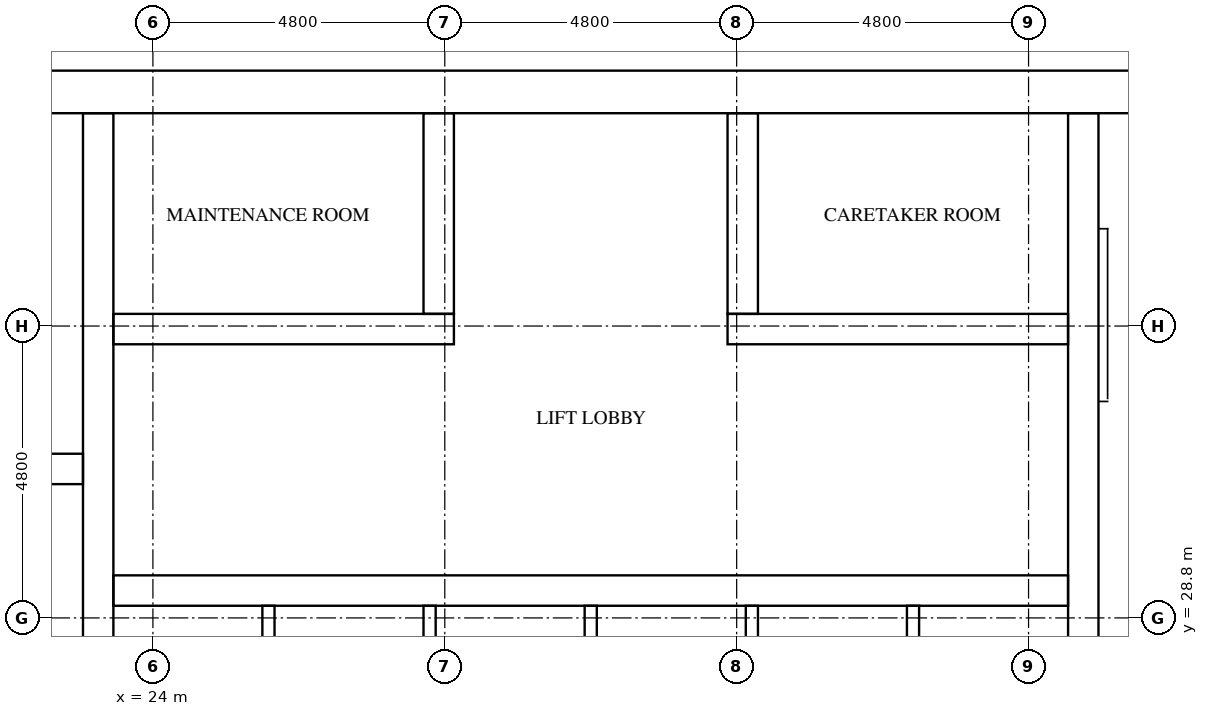
"""IFC4 building model, lengths in metres.
Left out: names, types, materials, properties, quantities, classifications, styles, units other than length and angle.
Written with IfcOpenShell. Run it as: python <this file> out.ifc"""

import sys

from ifc_helpers import new_model, si_unit, direction, frame, frame_2d, origin, place, context, subcontext, project, spatial, rectangle, extrude, element, fill, save


model = new_model("IFC4")
c1 = context("Model", 3, precision=1e-05, world=origin(), true_north=direction((0.0, 1.0)))
c2 = subcontext(c1, "Body", "Model", "MODEL_VIEW")
j1 = project(units=[si_unit("LENGTHUNIT", "METRE"), si_unit("PLANEANGLEUNIT", "RADIAN")], contexts=[c1])
p1 = place(None, origin())
s1 = spatial("IfcSite", under=j1, at=p1, CompositionType="ELEMENT")
p2 = place(p1, origin())
s2 = spatial("IfcBuilding", under=s1, at=p2, CompositionType="ELEMENT")
p3 = place(p2, frame((0.0, 0.0, 219.3)))
s3 = spatial("IfcBuildingStorey", under=s2, at=p3, CompositionType="ELEMENT", Elevation=219.3)
p4 = place(p3, frame((15.0, 37.45, 0.0), z_axis=(0.0, 0.0, 1.0), x_axis=(1.0, 0.0, 0.0)))
e1 = element("IfcWall", 1, at=p4, inside=s3, PredefinedType="SHEAR", context=c2, shape_type="SweptSolid", body=[
    extrude(rectangle(XDim=32.4, YDim=0.7, at=frame_2d((16.2, 0.0))), origin(), (0.0, 0.0, 1.0), 3.2),
])
p5 = place(p4, frame((15.3, 0.0, 0.0)))
e2 = element("IfcOpeningElement", 2, at=p5, cuts=e1, PredefinedType="OPENING", context=c2, shape_type="SweptSolid", body=[
    extrude(rectangle(XDim=1.8, YDim=2.1, at=frame_2d((0.9, 1.05))), frame((0.0, 0.36, 0.0), z_axis=(0.0, -1.0, 0.0), x_axis=(1.0, 0.0, 0.0)), (0.0, 0.0, 1.0), 0.72),
])
p6 = place(p4, frame((1.544, 0.0, 0.0)))
e3 = element("IfcOpeningElement", 3, at=p6, cuts=e1, PredefinedType="OPENING", context=c2, shape_type="SweptSolid", body=[
    extrude(rectangle(XDim=1.0, YDim=2.1, at=frame_2d((0.5, 1.05))), frame((0.0, 0.36, 0.0), z_axis=(0.0, -1.0, 0.0), x_axis=(1.0, 0.0, 0.0)), (0.0, 0.0, 1.0), 0.72),
])
p7 = place(p4, frame((5.219, 0.0, 0.0)))
e4 = element("IfcOpeningElement", 4, at=p7, cuts=e1, PredefinedType="OPENING", context=c2, shape_type="SweptSolid", body=[
    extrude(rectangle(XDim=1.0, YDim=2.1, at=frame_2d((0.5, 1.05))), frame((0.0, 0.36, 0.0), z_axis=(0.0, -1.0, 0.0), x_axis=(1.0, 0.0, 0.0)), (0.0, 0.0, 1.0), 0.72),
])
p8 = place(p3, frame((23.1, 15.7, 0.0), z_axis=(0.0, 0.0, 1.0), x_axis=(0.0, 1.0, 0.0)))
e5 = element("IfcWall", 5, at=p8, inside=s3, PredefinedType="SHEAR", context=c2, shape_type="SweptSolid", body=[
    extrude(rectangle(XDim=21.4, YDim=0.5, at=frame_2d((10.7, 0.0))), origin(), (0.0, 0.0, 1.0), 3.2),
])
p9 = place(p3, frame((39.3, 27.75, 0.0), z_axis=(0.0, 0.0, 1.0), x_axis=(0.0, 1.0, 0.0)))
e6 = element("IfcWall", 6, at=p9, inside=s3, PredefinedType="SHEAR", context=c2, shape_type="SweptSolid", body=[
    extrude(rectangle(XDim=9.35, YDim=0.5, at=frame_2d((4.675, 0.0))), origin(), (0.0, 0.0, 1.0), 3.2),
])
p10 = place(p3, frame((15.7, 31.25, 0.0), z_axis=(0.0, 0.0, 1.0), x_axis=(1.0, 0.0, 0.0)))
e7 = element("IfcWall", 7, at=p10, inside=s3, PredefinedType="SHEAR", context=c2, shape_type="SweptSolid", body=[
    extrude(rectangle(XDim=7.15, YDim=0.5, at=frame_2d((3.575, 0.0))), origin(), (0.0, 0.0, 1.0), 3.2),
])
p11 = place(p3, frame((23.35, 29.25, 0.0), z_axis=(0.0, 0.0, 1.0), x_axis=(1.0, 0.0, 0.0)))
e8 = element("IfcWall", 8, at=p11, inside=s3, PredefinedType="SHEAR", context=c2, shape_type="SweptSolid", body=[
    extrude(rectangle(XDim=15.7, YDim=0.5, at=frame_2d((7.85, 0.0))), origin(), (0.0, 0.0, 1.0), 3.2),
])
p12 = place(p11, frame((0.675, 0.0, 0.0)))
e9 = element("IfcOpeningElement", 9, at=p12, cuts=e8, PredefinedType="OPENING", context=c2, shape_type="SweptSolid", body=[
    extrude(rectangle(XDim=1.1, YDim=2.1, at=frame_2d((0.55, 1.05))), frame((0.0, 0.26, 0.0), z_axis=(0.0, -1.0, 0.0), x_axis=(1.0, 0.0, 0.0)), (0.0, 0.0, 1.0), 0.52),
])
p13 = place(p11, frame((3.325, 0.0, 0.0)))
e10 = element("IfcOpeningElement", 10, at=p13, cuts=e8, PredefinedType="OPENING", context=c2, shape_type="SweptSolid", body=[
    extrude(rectangle(XDim=1.1, YDim=2.1, at=frame_2d((0.55, 1.05))), frame((0.0, 0.26, 0.0), z_axis=(0.0, -1.0, 0.0), x_axis=(1.0, 0.0, 0.0)), (0.0, 0.0, 1.0), 0.52),
])
p14 = place(p11, frame((5.975, 0.0, 0.0)))
e11 = element("IfcOpeningElement", 11, at=p14, cuts=e8, PredefinedType="OPENING", context=c2, shape_type="SweptSolid", body=[
    extrude(rectangle(XDim=1.1, YDim=2.1, at=frame_2d((0.55, 1.05))), frame((0.0, 0.26, 0.0), z_axis=(0.0, -1.0, 0.0), x_axis=(1.0, 0.0, 0.0)), (0.0, 0.0, 1.0), 0.52),
])
p15 = place(p11, frame((8.625, 0.0, 0.0)))
e12 = element("IfcOpeningElement", 12, at=p15, cuts=e8, PredefinedType="OPENING", context=c2, shape_type="SweptSolid", body=[
    extrude(rectangle(XDim=1.1, YDim=2.1, at=frame_2d((0.55, 1.05))), frame((0.0, 0.26, 0.0), z_axis=(0.0, -1.0, 0.0), x_axis=(1.0, 0.0, 0.0)), (0.0, 0.0, 1.0), 0.52),
])
p16 = place(p11, frame((11.275, 0.0, 0.0)))
e13 = element("IfcOpeningElement", 13, at=p16, cuts=e8, PredefinedType="OPENING", context=c2, shape_type="SweptSolid", body=[
    extrude(rectangle(XDim=1.1, YDim=2.1, at=frame_2d((0.55, 1.05))), frame((0.0, 0.26, 0.0), z_axis=(0.0, -1.0, 0.0), x_axis=(1.0, 0.0, 0.0)), (0.0, 0.0, 1.0), 0.52),
])
p17 = place(p11, frame((13.925, 0.0, 0.0)))
e14 = element("IfcOpeningElement", 14, at=p17, cuts=e8, PredefinedType="OPENING", context=c2, shape_type="SweptSolid", body=[
    extrude(rectangle(XDim=1.1, YDim=2.1, at=frame_2d((0.55, 1.05))), frame((0.0, 0.26, 0.0), z_axis=(0.0, -1.0, 0.0), x_axis=(1.0, 0.0, 0.0)), (0.0, 0.0, 1.0), 0.52),
])
p18 = place(p3, frame((23.35, 33.55, 0.0), z_axis=(0.0, 0.0, 1.0), x_axis=(1.0, 0.0, 0.0)))
e15 = element("IfcWall", 15, at=p18, inside=s3, PredefinedType="SHEAR", context=c2, shape_type="SweptSolid", body=[
    extrude(rectangle(XDim=5.6, YDim=0.5, at=frame_2d((2.8, 0.0))), origin(), (0.0, 0.0, 1.0), 3.2),
])
p19 = place(p18, frame((2.05, 0.0, 0.0)))
e16 = element("IfcOpeningElement", 16, at=p19, cuts=e15, PredefinedType="OPENING", context=c2, shape_type="SweptSolid", body=[
    extrude(rectangle(XDim=1.0, YDim=2.1, at=frame_2d((0.5, 1.05))), frame((0.0, 0.26, 0.0), z_axis=(0.0, -1.0, 0.0), x_axis=(1.0, 0.0, 0.0)), (0.0, 0.0, 1.0), 0.52),
])
p20 = place(p3, frame((33.45, 33.55, 0.0), z_axis=(0.0, 0.0, 1.0), x_axis=(1.0, 0.0, 0.0)))
e17 = element("IfcWall", 17, at=p20, inside=s3, PredefinedType="SHEAR", context=c2, shape_type="SweptSolid", body=[
    extrude(rectangle(XDim=5.6, YDim=0.5, at=frame_2d((2.8, 0.0))), origin(), (0.0, 0.0, 1.0), 3.2),
])
p21 = place(p20, frame((2.55, 0.0, 0.0)))
e18 = element("IfcOpeningElement", 18, at=p21, cuts=e17, PredefinedType="OPENING", context=c2, shape_type="SweptSolid", body=[
    extrude(rectangle(XDim=1.0, YDim=2.1, at=frame_2d((0.5, 1.05))), frame((0.0, 0.26, 0.0), z_axis=(0.0, -1.0, 0.0), x_axis=(1.0, 0.0, 0.0)), (0.0, 0.0, 1.0), 0.52),
])
for number, where, z_axis, x_axis in (
    (19, (28.7, 33.8, 0.0), (0.0, 0.0, 1.0), (0.0, 1.0, 0.0)),
    (20, (33.7, 33.8, 0.0), (0.0, 0.0, 1.0), (0.0, 1.0, 0.0)),
):
    element("IfcWall", number, at=place(p3, frame(where, z_axis=z_axis, x_axis=x_axis)), inside=s3, PredefinedType="SHEAR", context=c2, shape_type="SweptSolid", body=[
        extrude(rectangle(XDim=3.3, YDim=0.5, at=frame_2d((1.65, 0.0))), origin(), (0.0, 0.0, 1.0), 3.2),
    ])
for number, where, z_axis, x_axis in (
    (21, (25.9, 26.4, 0.0), (0.0, 0.0, 1.0), (0.0, 1.0, 0.0)),
    (22, (28.55, 26.4, 0.0), (0.0, 0.0, 1.0), (0.0, 1.0, 0.0)),
    (23, (31.2, 26.4, 0.0), (0.0, 0.0, 1.0), (0.0, 1.0, 0.0)),
    (24, (33.85, 26.4, 0.0), (0.0, 0.0, 1.0), (0.0, 1.0, 0.0)),
    (25, (36.5, 26.4, 0.0), (0.0, 0.0, 1.0), (0.0, 1.0, 0.0)),
):
    element("IfcWall", number, at=place(p3, frame(where, z_axis=z_axis, x_axis=x_axis)), inside=s3, PredefinedType="SOLIDWALL", context=c2, shape_type="SweptSolid", body=[
        extrude(rectangle(XDim=2.6, YDim=0.2, at=frame_2d((1.3, 0.0))), origin(), (0.0, 0.0, 1.0), 3.2),
    ])
p22 = place(p12, origin())
e26 = element("IfcDoor", 26, at=p22, inside=s3, OperationType="DOUBLE_DOOR_SLIDING", PredefinedType="DOOR", context=c2, shape_type="SweptSolid", body=[
    extrude(rectangle(XDim=1.1, YDim=2.1, at=frame_2d((0.55, 1.05))), frame((0.0, 0.025, 0.0), z_axis=(0.0, -1.0, 0.0), x_axis=(1.0, 0.0, 0.0)), (0.0, 0.0, 1.0), 0.05),
])
fill(e9, e26)
p23 = place(p13, origin())
e27 = element("IfcDoor", 27, at=p23, inside=s3, OperationType="DOUBLE_DOOR_SLIDING", PredefinedType="DOOR", context=c2, shape_type="SweptSolid", body=[
    extrude(rectangle(XDim=1.1, YDim=2.1, at=frame_2d((0.55, 1.05))), frame((0.0, 0.025, 0.0), z_axis=(0.0, -1.0, 0.0), x_axis=(1.0, 0.0, 0.0)), (0.0, 0.0, 1.0), 0.05),
])
fill(e10, e27)
p24 = place(p14, origin())
e28 = element("IfcDoor", 28, at=p24, inside=s3, OperationType="DOUBLE_DOOR_SLIDING", PredefinedType="DOOR", context=c2, shape_type="SweptSolid", body=[
    extrude(rectangle(XDim=1.1, YDim=2.1, at=frame_2d((0.55, 1.05))), frame((0.0, 0.025, 0.0), z_axis=(0.0, -1.0, 0.0), x_axis=(1.0, 0.0, 0.0)), (0.0, 0.0, 1.0), 0.05),
])
fill(e11, e28)
p25 = place(p15, origin())
e29 = element("IfcDoor", 29, at=p25, inside=s3, OperationType="DOUBLE_DOOR_SLIDING", PredefinedType="DOOR", context=c2, shape_type="SweptSolid", body=[
    extrude(rectangle(XDim=1.1, YDim=2.1, at=frame_2d((0.55, 1.05))), frame((0.0, 0.025, 0.0), z_axis=(0.0, -1.0, 0.0), x_axis=(1.0, 0.0, 0.0)), (0.0, 0.0, 1.0), 0.05),
])
fill(e12, e29)
p26 = place(p16, origin())
e30 = element("IfcDoor", 30, at=p26, inside=s3, OperationType="DOUBLE_DOOR_SLIDING", PredefinedType="DOOR", context=c2, shape_type="SweptSolid", body=[
    extrude(rectangle(XDim=1.1, YDim=2.1, at=frame_2d((0.55, 1.05))), frame((0.0, 0.025, 0.0), z_axis=(0.0, -1.0, 0.0), x_axis=(1.0, 0.0, 0.0)), (0.0, 0.0, 1.0), 0.05),
])
fill(e13, e30)
p27 = place(p17, origin())
e31 = element("IfcDoor", 31, at=p27, inside=s3, OperationType="DOUBLE_DOOR_SLIDING", PredefinedType="DOOR", context=c2, shape_type="SweptSolid", body=[
    extrude(rectangle(XDim=1.1, YDim=2.1, at=frame_2d((0.55, 1.05))), frame((0.0, 0.025, 0.0), z_axis=(0.0, -1.0, 0.0), x_axis=(1.0, 0.0, 0.0)), (0.0, 0.0, 1.0), 0.05),
])
fill(e14, e31)
p28 = place(p5, origin())
e32 = element("IfcDoor", 32, at=p28, inside=s3, OperationType="DOUBLE_DOOR_SINGLE_SWING", PredefinedType="DOOR", context=c2, shape_type="SweptSolid", body=[
    extrude(rectangle(XDim=1.8, YDim=2.1, at=frame_2d((0.9, 1.05))), frame((0.0, 0.025, 0.0), z_axis=(0.0, -1.0, 0.0), x_axis=(1.0, 0.0, 0.0)), (0.0, 0.0, 1.0), 0.05),
])
fill(e2, e32)
p29 = place(p19, frame((1.0, 0.0, 0.0), z_axis=(0.0, 0.0, 1.0), x_axis=(-1.0, 0.0, 0.0)))
e33 = element("IfcDoor", 33, at=p29, inside=s3, OperationType="SINGLE_SWING_RIGHT", PredefinedType="DOOR", context=c2, shape_type="SweptSolid", body=[
    extrude(rectangle(XDim=1.0, YDim=2.1, at=frame_2d((0.5, 1.05))), frame((0.0, 0.025, 0.0), z_axis=(0.0, -1.0, 0.0), x_axis=(1.0, 0.0, 0.0)), (0.0, 0.0, 1.0), 0.05),
])
fill(e16, e33)
p30 = place(p21, frame((1.0, 0.0, 0.0), z_axis=(0.0, 0.0, 1.0), x_axis=(-1.0, 0.0, 0.0)))
e34 = element("IfcDoor", 34, at=p30, inside=s3, OperationType="SINGLE_SWING_LEFT", PredefinedType="DOOR", context=c2, shape_type="SweptSolid", body=[
    extrude(rectangle(XDim=1.0, YDim=2.1, at=frame_2d((0.5, 1.05))), frame((0.0, 0.025, 0.0), z_axis=(0.0, -1.0, 0.0), x_axis=(1.0, 0.0, 0.0)), (0.0, 0.0, 1.0), 0.05),
])
fill(e18, e34)
save(model, sys.argv[1])
